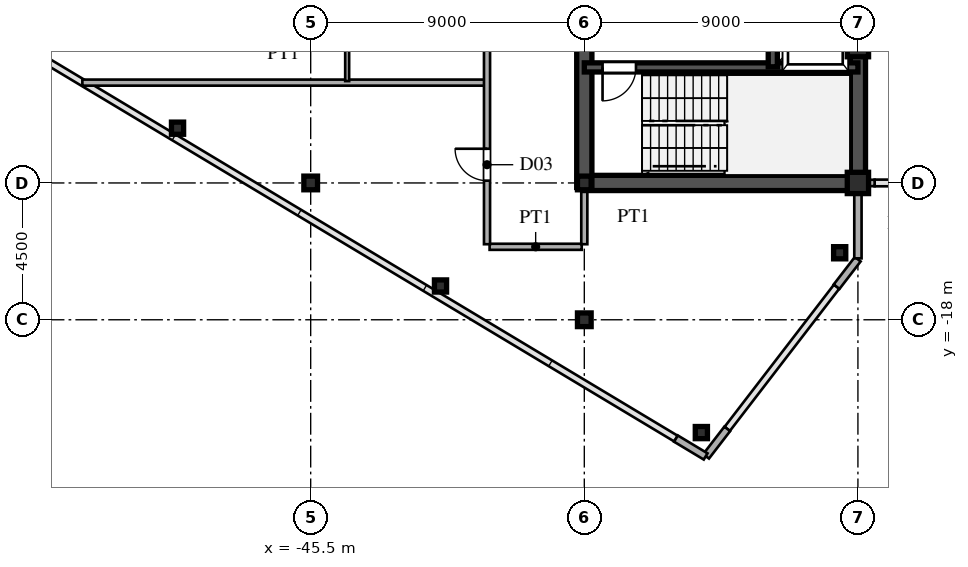
"""IFC4 building model, lengths in metres.
Left out: names, types, materials, properties, quantities, classifications, styles, units other than length and angle.
Written with IfcOpenShell. Run it as: python <this file> out.ifc"""

import sys

from ifc_helpers import new_model, si_unit, direction, frame, frame_2d, origin, origin_2d, place, context, subcontext, project, spatial, rectangle, hollow_rectangle, i_section, extrude, source, transform, mapped, element, fill, save


model = new_model("IFC4")
c1 = context("Model", 3, precision=1e-05, world=origin(), true_north=direction((0.0, 1.0)))
c2 = subcontext(c1, "Body", "Model", "MODEL_VIEW")
j1 = project(units=[si_unit("LENGTHUNIT", "METRE"), si_unit("PLANEANGLEUNIT", "RADIAN")], contexts=[c1])
p1 = place(None, origin())
s1 = spatial("IfcSite", under=j1, at=p1, CompositionType="ELEMENT")
p2 = place(p1, origin())
s2 = spatial("IfcBuilding", under=s1, at=p2, CompositionType="ELEMENT")
p3 = place(p2, frame((0.0, 0.0, 246.9)))
s3 = spatial("IfcBuildingStorey", under=s2, at=p3, CompositionType="ELEMENT", Elevation=246.9)
m1 = source(origin(), c2, "Body", "SweptSolid", [
    extrude(hollow_rectangle(XDim=0.7, YDim=0.7, WallThickness=0.03, at=origin_2d()), origin(), (0.0, 0.0, 1.0), 3.75),
])
for number, where, z_axis, x_axis in (
    (1, (-27.5, -13.5, 0.0), (0.0, 0.0, 1.0), (1.0, 0.0, 0.0)),
    (2, (-27.5, -9.0, 0.0), (0.0, 0.0, 1.0), (1.0, 0.0, 0.0)),
):
    element("IfcColumn", number, at=place(p3, frame(where, z_axis=z_axis, x_axis=x_axis)), inside=s3, PredefinedType="COLUMN", context=c2, shape_type="MappedRepresentation", body=[
        mapped(m1, transform((0.0, 0.0, 0.0), scale=1.0)),
    ])
m2 = source(origin(), c2, "Body", "SweptSolid", [
    extrude(i_section(OverallWidth=0.45, OverallDepth=0.45, WebThickness=0.016, FlangeThickness=0.025, at=origin_2d()), origin(), (0.0, 0.0, 1.0), 3.75),
])
for number, where, z_axis, x_axis in (
    (3, (-36.5, -18.0, 0.0), (0.0, 0.0, 1.0), (1.0, 0.0, 0.0)),
    (4, (-36.5, -13.5, 0.0), (0.0, 0.0, 1.0), (1.0, 0.0, 0.0)),
    (5, (-45.5, -13.5, 0.0), (0.0, 0.0, 1.0), (1.0, 0.0, 0.0)),
):
    element("IfcColumn", number, at=place(p3, frame(where, z_axis=z_axis, x_axis=x_axis)), inside=s3, PredefinedType="COLUMN", context=c2, shape_type="MappedRepresentation", body=[
        mapped(m2, transform((0.0, 0.0, 0.0), scale=1.0)),
    ])
m3 = source(origin(), c2, "Body", "SweptSolid", [
    extrude(hollow_rectangle(XDim=0.4, YDim=0.4, WallThickness=0.016, at=origin_2d()), origin(), (0.0, 0.0, 1.0), 3.75),
])
for number, where, z_axis, x_axis in (
    (6, (-28.1, -15.796, 0.0), (0.0, 0.0, 1.0), (1.0, 0.0, 0.0)),
    (7, (-32.65, -21.71, 0.0), (0.0, 0.0, 1.0), (1.0, 0.0, 0.0)),
    (8, (-41.23, -16.889, 0.0), (0.0, 0.0, 1.0), (1.0, 0.0, 0.0)),
    (9, (-49.88, -11.699, 0.0), (0.0, 0.0, 1.0), (1.0, 0.0, 0.0)),
):
    element("IfcColumn", number, at=place(p3, frame(where, z_axis=z_axis, x_axis=x_axis)), inside=s3, PredefinedType="COLUMN", context=c2, shape_type="MappedRepresentation", body=[
        mapped(m3, transform((0.0, 0.0, 0.0), scale=1.0)),
    ])
p4 = place(p3, frame((-27.5, -15.98, 0.0), z_axis=(0.0, 0.0, 1.0), x_axis=(0.0, 1.0, 0.0)))
e10 = element("IfcWall", 10, at=p4, inside=s3, PredefinedType="SOLIDWALL", context=c2, shape_type="SweptSolid", body=[
    extrude(rectangle(XDim=1.605, YDim=0.24, at=frame_2d((0.803, 0.0))), origin(), (0.0, 0.0, 1.0), 3.53),
])
p5 = place(p3, frame((-27.5, -14.375, 0.0), z_axis=(0.0, 0.0, 1.0), x_axis=(0.0, 1.0, 0.0)))
e11 = element("IfcWall", 11, at=p5, inside=s3, PredefinedType="SOLIDWALL", context=c2, shape_type="SweptSolid", body=[
    extrude(rectangle(XDim=0.62, YDim=0.24, at=frame_2d((0.31, 0.0))), origin(), (0.0, 0.0, 1.0), 3.03),
])
for number, where, z_axis, x_axis in (
    (12, (-33.486, -21.908, 0.0), (0.0, 0.0, 1.0), (0.857, -0.515, 0.0)),
    (13, (-32.494, -22.492, 0.0), (0.0, 0.0, 1.0), (0.61, 0.793, 0.0)),
    (14, (-28.201, -16.912, 0.0), (0.0, 0.0, 1.0), (0.61, 0.793, 0.0)),
):
    element("IfcWall", number, at=place(p3, frame(where, z_axis=z_axis, x_axis=x_axis)), inside=s3, PredefinedType="SOLIDWALL", context=c2, shape_type="SweptSolid", body=[
        extrude(rectangle(XDim=1.14, YDim=0.24, at=frame_2d((0.57, 0.0))), origin(), (0.0, 0.0, 1.0), 3.53),
    ])
p6 = place(p3, frame((-27.49, -13.5, 0.0), z_axis=(0.0, 0.0, 1.0), x_axis=(1.0, 0.0, 0.0)))
e15 = element("IfcWall", 15, at=p6, inside=s3, PredefinedType="SOLIDWALL", context=c2, shape_type="SweptSolid", body=[
    extrude(rectangle(XDim=0.54, YDim=0.21, at=frame_2d((0.27, 0.0))), origin(), (0.0, 0.0, 1.0), 3.03),
])
p7 = place(p3, frame((-27.5, -13.5, 0.0), z_axis=(0.0, 0.0, 1.0), x_axis=(0.0, 1.0, 0.0)))
e16 = element("IfcWall", 16, at=p7, inside=s3, PredefinedType="SHEAR", context=c2, shape_type="SweptSolid", body=[
    extrude(rectangle(XDim=12.2, YDim=0.5, at=frame_2d((6.1, 0.0))), origin(), (0.0, 0.0, 1.0), 3.53),
])
p8 = place(p3, frame((-36.5, -13.5, 0.0), z_axis=(0.0, 0.0, 1.0), x_axis=(1.0, 0.0, 0.0)))
e17 = element("IfcWall", 17, at=p8, inside=s3, PredefinedType="SHEAR", context=c2, shape_type="SweptSolid", body=[
    extrude(rectangle(XDim=9.0, YDim=0.5, at=frame_2d((4.5, 0.0))), origin(), (0.0, 0.0, 1.0), 3.53),
])
p9 = place(p3, frame((-36.5, -13.65, 0.0), z_axis=(0.0, 0.0, 1.0), x_axis=(0.0, 1.0, 0.0)))
e18 = element("IfcWall", 18, at=p9, inside=s3, PredefinedType="SHEAR", context=c2, shape_type="SweptSolid", body=[
    extrude(rectangle(XDim=7.15, YDim=0.5, at=frame_2d((3.575, 0.0))), origin(), (0.0, 0.0, 1.0), 3.53),
])
p10 = place(p9, frame((4.675, 0.0, 0.0)))
e19 = element("IfcOpeningElement", 19, at=p10, cuts=e18, PredefinedType="OPENING", context=c2, shape_type="SweptSolid", body=[
    extrude(rectangle(XDim=1.15, YDim=2.2, at=frame_2d((0.575, 1.1))), frame((0.0, 0.26, 0.0), z_axis=(0.0, -1.0, 0.0), x_axis=(1.0, 0.0, 0.0)), (0.0, 0.0, 1.0), 0.52),
])
p11 = place(p3, frame((-36.5, -9.7, 0.0), z_axis=(0.0, 0.0, 1.0), x_axis=(1.0, 0.0, 0.0)))
e20 = element("IfcWall", 20, at=p11, inside=s3, PredefinedType="SHEAR", context=c2, shape_type="SweptSolid", body=[
    extrude(rectangle(XDim=9.0, YDim=0.3, at=frame_2d((4.5, 0.0))), origin(), (0.0, 0.0, 1.0), 3.53),
])
p12 = place(p11, frame((0.6, 0.0, 0.0)))
e21 = element("IfcOpeningElement", 21, at=p12, cuts=e20, PredefinedType="OPENING", context=c2, shape_type="SweptSolid", body=[
    extrude(rectangle(XDim=1.1, YDim=2.2, at=frame_2d((0.55, 1.1))), frame((0.0, 0.16, 0.0), z_axis=(0.0, -1.0, 0.0), x_axis=(1.0, 0.0, 0.0)), (0.0, 0.0, 1.0), 0.32),
])
p13 = place(p3, frame((-30.3, -9.68, 0.0), z_axis=(0.0, 0.0, 1.0), x_axis=(0.0, 1.0, 0.0)))
e22 = element("IfcWall", 22, at=p13, inside=s3, PredefinedType="SHEAR", context=c2, shape_type="SweptSolid", body=[
    extrude(rectangle(XDim=2.56, YDim=0.3, at=frame_2d((1.28, 0.0))), origin(), (0.0, 0.0, 1.0), 3.53),
])
p14 = place(p13, frame((0.68, 0.0, 0.0)))
e23 = element("IfcOpeningElement", 23, at=p14, cuts=e22, PredefinedType="OPENING", context=c2, shape_type="SweptSolid", body=[
    extrude(rectangle(XDim=1.2, YDim=2.25, at=frame_2d((0.6, 1.125))), frame((0.0, 0.16, 0.0), z_axis=(0.0, -1.0, 0.0), x_axis=(1.0, 0.0, 0.0)), (0.0, 0.0, 1.0), 0.32),
])
p15 = place(p3, frame((-39.615, -15.6, 0.0), z_axis=(0.0, 0.0, 1.0), x_axis=(1.0, 0.0, 0.0)))
e24 = element("IfcWall", 24, at=p15, inside=s3, PredefinedType="PARTITIONING", context=c2, shape_type="SweptSolid", body=[
    extrude(rectangle(XDim=3.03, YDim=0.2, at=frame_2d((1.515, 0.0))), origin(), (0.0, 0.0, 1.0), 3.53),
])
p16 = place(p3, frame((-53.01, -10.2, 0.0), z_axis=(0.0, 0.0, 1.0), x_axis=(1.0, 0.0, 0.0)))
e25 = element("IfcWall", 25, at=p16, inside=s3, PredefinedType="PARTITIONING", context=c2, shape_type="SweptSolid", body=[
    extrude(rectangle(XDim=13.23, YDim=0.2, at=frame_2d((6.615, 0.0))), origin(), (0.0, 0.0, 1.0), 3.53),
])
p17 = place(p3, frame((-44.3, -10.15, 0.0), z_axis=(0.0, 0.0, 1.0), x_axis=(0.0, 1.0, 0.0)))
e26 = element("IfcWall", 26, at=p17, inside=s3, PredefinedType="PARTITIONING", context=c2, shape_type="SweptSolid", body=[
    extrude(rectangle(XDim=3.3, YDim=0.13, at=frame_2d((1.65, 0.0))), origin(), (0.0, 0.0, 1.0), 3.53),
])
p18 = place(p3, frame((-39.7, -15.515, 0.0), z_axis=(0.0, 0.0, 1.0), x_axis=(0.0, 1.0, 0.0)))
e27 = element("IfcWall", 27, at=p18, inside=s3, PredefinedType="PARTITIONING", context=c2, shape_type="SweptSolid", body=[
    extrude(rectangle(XDim=31.03, YDim=0.2, at=frame_2d((15.515, 0.0))), origin(), (0.0, 0.0, 1.0), 3.53),
])
p19 = place(p18, frame((2.09, 0.0, 0.0)))
e28 = element("IfcOpeningElement", 28, at=p19, cuts=e27, PredefinedType="OPENING", context=c2, shape_type="SweptSolid", body=[
    extrude(rectangle(XDim=1.05, YDim=2.25, at=frame_2d((0.525, 1.125))), frame((0.0, 0.11, 0.0), z_axis=(0.0, -1.0, 0.0), x_axis=(1.0, 0.0, 0.0)), (0.0, 0.0, 1.0), 0.22),
])
p20 = place(p18, frame((10.901, 0.0, 0.0)))
e29 = element("IfcOpeningElement", 29, at=p20, cuts=e27, PredefinedType="OPENING", context=c2, shape_type="SweptSolid", body=[
    extrude(rectangle(XDim=1.05, YDim=2.25, at=frame_2d((0.525, 1.125))), frame((0.0, 0.11, 0.0), z_axis=(0.0, -1.0, 0.0), x_axis=(1.0, 0.0, 0.0)), (0.0, 0.0, 1.0), 0.22),
])
p21 = place(p18, frame((23.99, 0.0, 0.0)))
e30 = element("IfcOpeningElement", 30, at=p21, cuts=e27, PredefinedType="OPENING", context=c2, shape_type="SweptSolid", body=[
    extrude(rectangle(XDim=1.05, YDim=2.25, at=frame_2d((0.525, 1.125))), frame((0.0, 0.11, 0.0), z_axis=(0.0, -1.0, 0.0), x_axis=(1.0, 0.0, 0.0)), (0.0, 0.0, 1.0), 0.22),
])
p22 = place(p3, frame((-36.5, -15.515, 0.0), z_axis=(0.0, 0.0, 1.0), x_axis=(0.0, 1.0, 0.0)))
e31 = element("IfcWall", 31, at=p22, inside=s3, PredefinedType="PARTITIONING", context=c2, shape_type="SweptSolid", body=[
    extrude(rectangle(XDim=1.76, YDim=0.2, at=frame_2d((0.88, 0.0))), origin(), (0.0, 0.0, 1.0), 2.93),
])
m4 = source(origin(), c2, "Body", "SweptSolid", [
    extrude(rectangle(XDim=1.1, YDim=2.2, at=frame_2d((0.55, 1.1))), frame((0.0, 0.025, 0.0), z_axis=(0.0, -1.0, 0.0), x_axis=(1.0, 0.0, 0.0)), (0.0, 0.0, 1.0), 0.05),
])
p23 = place(p12, frame((1.1, 0.0, 0.0), z_axis=(0.0, 0.0, 1.0), x_axis=(-1.0, 0.0, 0.0)))
e32 = element("IfcDoor", 32, at=p23, inside=s3, OperationType="SINGLE_SWING_LEFT", PredefinedType="DOOR", context=c2, shape_type="MappedRepresentation", body=[
    mapped(m4, transform((0.0, 0.0, 0.0), scale=1.0)),
])
fill(e21, e32)
m5 = source(origin(), c2, "Body", "SweptSolid", [
    extrude(rectangle(XDim=1.05, YDim=2.25, at=frame_2d((0.525, 1.125))), frame((0.0, 0.025, 0.0), z_axis=(0.0, -1.0, 0.0), x_axis=(1.0, 0.0, 0.0)), (0.0, 0.0, 1.0), 0.05),
])
p24 = place(p19, origin())
e33 = element("IfcDoor", 33, at=p24, inside=s3, OperationType="SINGLE_SWING_RIGHT", PredefinedType="DOOR", context=c2, shape_type="MappedRepresentation", body=[
    mapped(m5, transform((0.0, 0.0, 0.0), scale=1.0)),
])
fill(e28, e33)
save(model, sys.argv[1])
